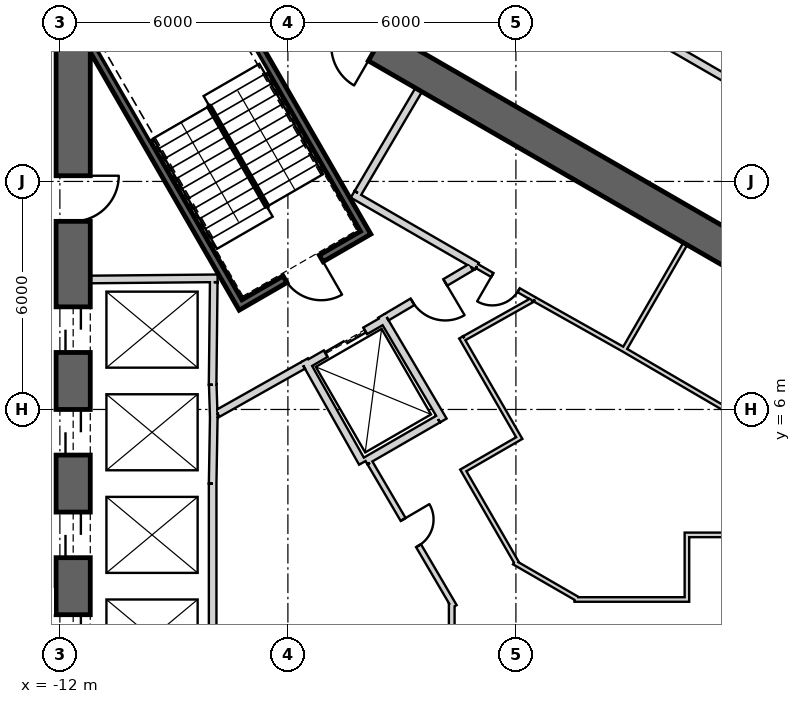
"""IFC4 building model, lengths in metres.
Left out: names, types, materials, properties, quantities, classifications, styles, units other than length and angle.
Written with IfcOpenShell. Run it as: python <this file> out.ifc"""

import sys

from ifc_helpers import new_model, si_unit, direction, frame, frame_2d, origin, place, context, subcontext, project, spatial, rectangle, extrude, element, fill, save


model = new_model("IFC4")
c1 = context("Model", 3, precision=1e-05, world=origin(), true_north=direction((0.0, 1.0)))
c2 = subcontext(c1, "Body", "Model", "MODEL_VIEW")
j1 = project(units=[si_unit("LENGTHUNIT", "METRE"), si_unit("PLANEANGLEUNIT", "RADIAN")], contexts=[c1])
p1 = place(None, origin())
s1 = spatial("IfcSite", under=j1, at=p1, CompositionType="ELEMENT")
p2 = place(p1, origin())
s2 = spatial("IfcBuilding", under=s1, at=p2, CompositionType="ELEMENT")
p3 = place(p2, frame((0.0, 0.0, 310.4)))
s3 = spatial("IfcBuildingStorey", under=s2, at=p3, CompositionType="ELEMENT", Elevation=310.4)
p4 = place(p3, frame((19.475, 2.208, 0.0), z_axis=(0.0, 0.0, 1.0), x_axis=(-0.866028369851, 0.499994862586, 0.0)))
e1 = element("IfcWall", 1, at=p4, inside=s3, PredefinedType="SHEAR", context=c2, shape_type="SweptSolid", body=[
    extrude(rectangle(XDim=31.523, YDim=0.9, at=frame_2d((15.762, 0.0))), origin(), (0.0, 0.0, 1.0), 3.9),
])
p5 = place(p4, frame((7.062, 0.0, 0.0)))
e2 = element("IfcOpeningElement", 2, at=p5, cuts=e1, PredefinedType="OPENING", context=c2, shape_type="SweptSolid", body=[
    extrude(rectangle(XDim=1.2, YDim=2.4, at=frame_2d((0.6, 1.2))), frame((0.0, 0.46, 0.0), z_axis=(0.0, -1.0, 0.0), x_axis=(1.0, 0.0, 0.0)), (0.0, 0.0, 1.0), 0.92),
])
p6 = place(p4, frame((3.612, 0.0, 0.0)))
e3 = element("IfcOpeningElement", 3, at=p6, cuts=e1, PredefinedType="OPENING", context=c2, shape_type="SweptSolid", body=[
    extrude(rectangle(XDim=1.2, YDim=2.4, at=frame_2d((0.6, 1.2))), frame((0.0, 0.46, 0.0), z_axis=(0.0, -1.0, 0.0), x_axis=(1.0, 0.0, 0.0)), (0.0, 0.0, 1.0), 0.92),
])
p7 = place(p4, frame((26.712, 0.0, 0.0)))
e4 = element("IfcOpeningElement", 4, at=p7, cuts=e1, PredefinedType="OPENING", context=c2, shape_type="SweptSolid", body=[
    extrude(rectangle(XDim=1.2, YDim=2.4, at=frame_2d((0.6, 1.2))), frame((0.0, 0.46, 0.0), z_axis=(0.0, -1.0, 0.0), x_axis=(1.0, 0.0, 0.0)), (0.0, 0.0, 1.0), 0.92),
])
p8 = place(p3, frame((-11.65, 15.762, 0.0), z_axis=(0.0, 0.0, 1.0), x_axis=(0.0, -1.0, 0.0)))
e5 = element("IfcWall", 5, at=p8, inside=s3, PredefinedType="SHEAR", context=c2, shape_type="SweptSolid", body=[
    extrude(rectangle(XDim=31.523, YDim=0.9, at=frame_2d((15.762, 0.0))), origin(), (0.0, 0.0, 1.0), 3.9),
])
p9 = place(p8, frame((7.062, 0.0, 0.0)))
e6 = element("IfcOpeningElement", 6, at=p9, cuts=e5, PredefinedType="OPENING", context=c2, shape_type="SweptSolid", body=[
    extrude(rectangle(XDim=1.2, YDim=2.4, at=frame_2d((0.6, 1.2))), frame((0.0, 0.46, 0.0), z_axis=(0.0, -1.0, 0.0), x_axis=(1.0, 0.0, 0.0)), (0.0, 0.0, 1.0), 0.92),
])
p10 = place(p8, frame((9.762, 0.0, 0.0)))
e7 = element("IfcOpeningElement", 7, at=p10, cuts=e5, PredefinedType="OPENING", context=c2, shape_type="SweptSolid", body=[
    extrude(rectangle(XDim=1.2, YDim=2.4, at=frame_2d((0.6, 1.2))), frame((0.0, 0.46, 0.0), z_axis=(0.0, -1.0, 0.0), x_axis=(1.0, 0.0, 0.0)), (0.0, 0.0, 1.0), 0.92),
])
p11 = place(p8, frame((12.462, 0.0, 0.0)))
e8 = element("IfcOpeningElement", 8, at=p11, cuts=e5, PredefinedType="OPENING", context=c2, shape_type="SweptSolid", body=[
    extrude(rectangle(XDim=1.2, YDim=2.4, at=frame_2d((0.6, 1.2))), frame((0.0, 0.46, 0.0), z_axis=(0.0, -1.0, 0.0), x_axis=(1.0, 0.0, 0.0)), (0.0, 0.0, 1.0), 0.92),
])
p12 = place(p8, frame((15.162, 0.0, 0.0)))
e9 = element("IfcOpeningElement", 9, at=p12, cuts=e5, PredefinedType="OPENING", context=c2, shape_type="SweptSolid", body=[
    extrude(rectangle(XDim=1.2, YDim=2.4, at=frame_2d((0.6, 1.2))), frame((0.0, 0.46, 0.0), z_axis=(0.0, -1.0, 0.0), x_axis=(1.0, 0.0, 0.0)), (0.0, 0.0, 1.0), 0.92),
])
p13 = place(p8, frame((17.862, 0.0, 0.0)))
e10 = element("IfcOpeningElement", 10, at=p13, cuts=e5, PredefinedType="OPENING", context=c2, shape_type="SweptSolid", body=[
    extrude(rectangle(XDim=1.2, YDim=2.4, at=frame_2d((0.6, 1.2))), frame((0.0, 0.46, 0.0), z_axis=(0.0, -1.0, 0.0), x_axis=(1.0, 0.0, 0.0)), (0.0, 0.0, 1.0), 0.92),
])
p14 = place(p8, frame((20.562, 0.0, 0.0)))
e11 = element("IfcOpeningElement", 11, at=p14, cuts=e5, PredefinedType="OPENING", context=c2, shape_type="SweptSolid", body=[
    extrude(rectangle(XDim=1.2, YDim=2.4, at=frame_2d((0.6, 1.2))), frame((0.0, 0.46, 0.0), z_axis=(0.0, -1.0, 0.0), x_axis=(1.0, 0.0, 0.0)), (0.0, 0.0, 1.0), 0.92),
])
p15 = place(p8, frame((23.262, 0.0, 0.0)))
e12 = element("IfcOpeningElement", 12, at=p15, cuts=e5, PredefinedType="OPENING", context=c2, shape_type="SweptSolid", body=[
    extrude(rectangle(XDim=1.2, YDim=2.4, at=frame_2d((0.6, 1.2))), frame((0.0, 0.46, 0.0), z_axis=(0.0, -1.0, 0.0), x_axis=(1.0, 0.0, 0.0)), (0.0, 0.0, 1.0), 0.92),
])
p16 = place(p8, frame((3.612, 0.0, 0.0)))
e13 = element("IfcOpeningElement", 13, at=p16, cuts=e5, PredefinedType="OPENING", context=c2, shape_type="SweptSolid", body=[
    extrude(rectangle(XDim=1.2, YDim=2.4, at=frame_2d((0.6, 1.2))), frame((0.0, 0.46, 0.0), z_axis=(0.0, -1.0, 0.0), x_axis=(1.0, 0.0, 0.0)), (0.0, 0.0, 1.0), 0.92),
])
p17 = place(p8, frame((26.712, 0.0, 0.0)))
e14 = element("IfcOpeningElement", 14, at=p17, cuts=e5, PredefinedType="OPENING", context=c2, shape_type="SweptSolid", body=[
    extrude(rectangle(XDim=1.2, YDim=2.4, at=frame_2d((0.6, 1.2))), frame((0.0, 0.46, 0.0), z_axis=(0.0, -1.0, 0.0), x_axis=(1.0, 0.0, 0.0)), (0.0, 0.0, 1.0), 0.92),
])
p18 = place(p3, frame((-11.2, 9.42, 0.0), z_axis=(0.0, 0.0, 1.0), x_axis=(0.999957167047, 0.009255488683, 0.0)))
e15 = element("IfcWall", 15, at=p18, inside=s3, PredefinedType="PLUMBINGWALL", context=c2, shape_type="SweptSolid", body=[
    extrude(rectangle(XDim=3.35, YDim=0.2, at=frame_2d((1.675, 0.0))), origin(), (0.0, 0.0, 1.0), 3.6),
])
p19 = place(p3, frame((-7.951, 9.35, 0.0), z_axis=(0.0, 0.0, 1.0), x_axis=(-0.011120469654, -0.999938165666, 0.0)))
e16 = element("IfcWall", 16, at=p19, inside=s3, PredefinedType="PLUMBINGWALL", context=c2, shape_type="SweptSolid", body=[
    extrude(rectangle(XDim=2.7, YDim=0.2, at=frame_2d((1.35, 0.0))), origin(), (0.0, 0.0, 1.0), 3.6),
])
p20 = place(p3, frame((-7.977, 6.65, 0.0), z_axis=(0.0, 0.0, 1.0), x_axis=(0.030861509705, -0.999523670164, 0.0)))
e17 = element("IfcWall", 17, at=p20, inside=s3, PredefinedType="PLUMBINGWALL", context=c2, shape_type="SweptSolid", body=[
    extrude(rectangle(XDim=0.878, YDim=0.2, at=frame_2d((0.439, 0.0))), origin(), (0.0, 0.0, 1.0), 3.6),
])
p21 = place(p3, frame((-7.949, 5.894, 0.0), z_axis=(0.0, 0.0, 1.0), x_axis=(-0.016809909365, -0.999858703491, 0.0)))
e18 = element("IfcWall", 18, at=p21, inside=s3, PredefinedType="PLUMBINGWALL", context=c2, shape_type="SweptSolid", body=[
    extrude(rectangle(XDim=1.844, YDim=0.2, at=frame_2d((0.922, 0.0))), origin(), (0.0, 0.0, 1.0), 3.6),
])
p22 = place(p3, frame((-7.98, 4.05, 0.0), z_axis=(0.0, 0.0, 1.0), x_axis=(0.0, -1.0, 0.0)))
e19 = element("IfcWall", 19, at=p22, inside=s3, PredefinedType="PLUMBINGWALL", context=c2, shape_type="SweptSolid", body=[
    extrude(rectangle(XDim=8.1, YDim=0.2, at=frame_2d((4.05, 0.0))), origin(), (0.0, 0.0, 1.0), 3.6),
])
p23 = place(p3, frame((-11.245, 15.678, -0.3), z_axis=(0.0, 0.0, 1.0), x_axis=(0.499977274689, -0.866038523851, 0.0)))
e20 = element("IfcWall", 20, at=p23, inside=s3, PredefinedType="SHEAR", context=c2, shape_type="SweptSolid", body=[
    extrude(rectangle(XDim=8.1, YDim=0.2, at=frame_2d((4.05, 0.0))), origin(), (0.0, 0.0, 1.0), 3.9),
])
p24 = place(p3, frame((-7.854, 17.405, -0.3), z_axis=(0.0, 0.0, 1.0), x_axis=(0.499997992926, -0.866026562566, 0.0)))
e21 = element("IfcWall", 21, at=p24, inside=s3, PredefinedType="SHEAR", context=c2, shape_type="SweptSolid", body=[
    extrude(rectangle(XDim=7.9, YDim=0.2, at=frame_2d((3.95, 0.0))), origin(), (0.0, 0.0, 1.0), 3.9),
])
p25 = place(p3, frame((-7.159, 8.8, -0.3), z_axis=(0.0, 0.0, 1.0), x_axis=(0.866047807691, 0.499961193289, 0.0)))
e22 = element("IfcWall", 22, at=p25, inside=s3, PredefinedType="SHEAR", context=c2, shape_type="SweptSolid", body=[
    extrude(rectangle(XDim=3.6, YDim=0.2, at=frame_2d((1.8, 0.0))), origin(), (0.0, 0.0, 1.0), 3.9),
])
p26 = place(p25, frame((1.25, 0.0, 0.3)))
e23 = element("IfcOpeningElement", 23, at=p26, cuts=e22, PredefinedType="OPENING", context=c2, shape_type="SweptSolid", body=[
    extrude(rectangle(XDim=1.1, YDim=2.1, at=frame_2d((0.55, 1.05))), frame((0.0, 0.11, 0.0), z_axis=(0.0, -1.0, 0.0), x_axis=(1.0, 0.0, 0.0)), (0.0, 0.0, 1.0), 0.22),
])
p27 = place(p3, frame((-5.524, 7.168, 0.0), z_axis=(0.0, 0.0, 1.0), x_axis=(0.866024647952, 0.500001309137, 0.0)))
e24 = element("IfcWall", 24, at=p27, inside=s3, PredefinedType="PLUMBINGWALL", context=c2, shape_type="SweptSolid", body=[
    extrude(rectangle(XDim=2.4, YDim=0.2, at=frame_2d((1.2, 0.0))), origin(), (0.0, 0.0, 1.0), 3.6),
])
p28 = place(p27, frame((0.6, 0.0, 0.0)))
e25 = element("IfcOpeningElement", 25, at=p28, cuts=e24, PredefinedType="OPENING", context=c2, shape_type="SweptSolid", body=[
    extrude(rectangle(XDim=1.2, YDim=2.4, at=frame_2d((0.6, 1.2))), frame((0.0, 0.11, 0.0), z_axis=(0.0, -1.0, 0.0), x_axis=(1.0, 0.0, 0.0)), (0.0, 0.0, 1.0), 0.22),
])
p29 = place(p3, frame((-4.039, 4.596, 0.0), z_axis=(0.0, 0.0, 1.0), x_axis=(-0.491322718731, 0.870977603649, 0.0)))
e26 = element("IfcWall", 26, at=p29, inside=s3, PredefinedType="PLUMBINGWALL", context=c2, shape_type="SweptSolid", body=[
    extrude(rectangle(XDim=3.1, YDim=0.2, at=frame_2d((1.55, 0.0))), origin(), (0.0, 0.0, 1.0), 3.6),
])
p30 = place(p3, frame((-3.538, 8.465, 0.0), z_axis=(0.0, 0.0, 1.0), x_axis=(0.508616218331, -0.860993346345, 0.0)))
e27 = element("IfcWall", 27, at=p30, inside=s3, PredefinedType="PLUMBINGWALL", context=c2, shape_type="SweptSolid", body=[
    extrude(rectangle(XDim=3.2, YDim=0.2, at=frame_2d((1.6, 0.0))), origin(), (0.0, 0.0, 1.0), 3.6),
])
p31 = place(p3, frame((-2.047, 5.746, 0.0), z_axis=(0.0, 0.0, 1.0), x_axis=(-0.866019606374, -0.500010041276, 0.0)))
e28 = element("IfcWall", 28, at=p31, inside=s3, PredefinedType="PLUMBINGWALL", context=c2, shape_type="SweptSolid", body=[
    extrude(rectangle(XDim=2.205, YDim=0.2, at=frame_2d((1.102, 0.0))), origin(), (0.0, 0.0, 1.0), 3.6),
])
p32 = place(p3, frame((4.457, 10.359, 0.0), z_axis=(0.0, 0.0, 1.0), x_axis=(-0.500017246033, -0.866015446554, 0.0)))
e29 = element("IfcWall", 29, at=p32, inside=s3, PredefinedType="PARTITIONING", context=c2, shape_type="SweptSolid", body=[
    extrude(rectangle(XDim=3.25, YDim=0.12, at=frame_2d((1.625, 0.0))), origin(), (0.0, 0.0, 1.0), 3.6),
])
p33 = place(p3, frame((7.457, 4.875, 0.0), z_axis=(0.0, 0.0, 1.0), x_axis=(-0.863262357411, 0.504755487615, 0.0)))
e30 = element("IfcWall", 30, at=p33, inside=s3, PredefinedType="PARTITIONING", context=c2, shape_type="SweptSolid", body=[
    extrude(rectangle(XDim=5.37, YDim=0.12, at=frame_2d((2.685, 0.0))), origin(), (0.0, 0.0, 1.0), 3.6),
])
p34 = place(p3, frame((-1.024, 9.771, 0.0), z_axis=(0.0, 0.0, 1.0), x_axis=(0.866039397417, -0.499975761534, 0.0)))
e31 = element("IfcWall", 31, at=p34, inside=s3, PredefinedType="PARTITIONING", context=c2, shape_type="SweptSolid", body=[
    extrude(rectangle(XDim=1.752, YDim=0.12, at=frame_2d((0.876, 0.0))), origin(), (0.0, 0.0, 1.0), 3.6),
])
p35 = place(p34, frame((0.466, 0.0, 0.0)))
e32 = element("IfcOpeningElement", 32, at=p35, cuts=e31, PredefinedType="OPENING", context=c2, shape_type="SweptSolid", body=[
    extrude(rectangle(XDim=0.8, YDim=2.1, at=frame_2d((0.4, 1.05))), frame((0.0, 0.07, 0.0), z_axis=(0.0, -1.0, 0.0), x_axis=(1.0, 0.0, 0.0)), (0.0, 0.0, 1.0), 0.14),
])
p36 = place(p3, frame((-4.296, 11.66, 0.0), z_axis=(0.0, 0.0, 1.0), x_axis=(0.866027389382, -0.499996560828, 0.0)))
e33 = element("IfcWall", 33, at=p36, inside=s3, PredefinedType="PARTITIONING", context=c2, shape_type="SweptSolid", body=[
    extrude(rectangle(XDim=3.778, YDim=0.2, at=frame_2d((1.889, 0.0))), origin(), (0.0, 0.0, 1.0), 3.6),
])
p37 = place(p3, frame((-2.558, 14.409, 0.0), z_axis=(0.0, 0.0, 1.0), x_axis=(-0.508018930956, -0.861345903683, 0.0)))
e34 = element("IfcWall", 34, at=p37, inside=s3, PredefinedType="PARTITIONING", context=c2, shape_type="SweptSolid", body=[
    extrude(rectangle(XDim=3.15, YDim=0.2, at=frame_2d((1.575, 0.0))), origin(), (0.0, 0.0, 1.0), 3.6),
])
p38 = place(p3, frame((2.821, 7.586, 0.0), z_axis=(0.0, 0.0, 1.0), x_axis=(-0.871426548871, 0.490526013503, 0.0)))
e35 = element("IfcWall", 35, at=p38, inside=s3, PredefinedType="PARTITIONING", context=c2, shape_type="SweptSolid", body=[
    extrude(rectangle(XDim=2.67, YDim=0.12, at=frame_2d((1.335, 0.0))), origin(), (0.0, 0.0, 1.0), 3.6),
])
p39 = place(p3, frame((-5.6, 7.16, 0.0), z_axis=(0.0, 0.0, 1.0), x_axis=(-0.871340486379, -0.490678873396, 0.0)))
e36 = element("IfcWall", 36, at=p39, inside=s3, PredefinedType="PARTITIONING", context=c2, shape_type="SweptSolid", body=[
    extrude(rectangle(XDim=2.581, YDim=0.2, at=frame_2d((1.291, 0.0))), origin(), (0.0, 0.0, 1.0), 3.6),
])
p40 = place(p3, frame((-1.179, 9.745, 0.0), z_axis=(0.0, 0.0, 1.0), x_axis=(-0.860630814782, -0.509229418482, 0.0)))
e37 = element("IfcWall", 37, at=p40, inside=s3, PredefinedType="PARTITIONING", context=c2, shape_type="SweptSolid", body=[
    extrude(rectangle(XDim=2.582, YDim=0.2, at=frame_2d((1.291, 0.0))), origin(), (0.0, 0.0, 1.0), 3.6),
])
p41 = place(p40, frame((0.791, 0.0, 0.0)))
e38 = element("IfcOpeningElement", 38, at=p41, cuts=e37, PredefinedType="OPENING", context=c2, shape_type="SweptSolid", body=[
    extrude(rectangle(XDim=1.0, YDim=2.1, at=frame_2d((0.5, 1.05))), frame((0.0, 0.11, 0.0), z_axis=(0.0, -1.0, 0.0), x_axis=(1.0, 0.0, 0.0)), (0.0, 0.0, 1.0), 0.22),
])
p42 = place(p3, frame((-1.624, 0.815, 0.0), z_axis=(0.0, 0.0, 1.0), x_axis=(-0.505868173579, 0.862610799237, 0.0)))
e39 = element("IfcWall", 39, at=p42, inside=s3, PredefinedType="PLUMBINGWALL", context=c2, shape_type="SweptSolid", body=[
    extrude(rectangle(XDim=4.383, YDim=0.15, at=frame_2d((2.191, 0.0))), origin(), (0.0, 0.0, 1.0), 3.6),
])
p43 = place(p42, frame((1.855, 0.0, 0.0)))
e40 = element("IfcOpeningElement", 40, at=p43, cuts=e39, PredefinedType="OPENING", context=c2, shape_type="SweptSolid", body=[
    extrude(rectangle(XDim=0.8, YDim=2.1, at=frame_2d((0.4, 1.05))), frame((0.0, 0.085, 0.0), z_axis=(0.0, -1.0, 0.0), x_axis=(1.0, 0.0, 0.0)), (0.0, 0.0, 1.0), 0.17),
])
p44 = place(p3, frame((-1.689, -1.053, 0.0), z_axis=(0.0, 0.0, 1.0), x_axis=(0.0, 1.0, 0.0)))
e41 = element("IfcWall", 41, at=p44, inside=s3, PredefinedType="PLUMBINGWALL", context=c2, shape_type="SweptSolid", body=[
    extrude(rectangle(XDim=1.954, YDim=0.15, at=frame_2d((0.977, 0.0))), origin(), (0.0, 0.0, 1.0), 3.6),
])
p45 = place(p3, frame((4.44, 2.7, 0.0), z_axis=(0.0, 0.0, 1.0), x_axis=(1.0, 0.0, 0.0)))
e42 = element("IfcWall", 42, at=p45, inside=s3, PredefinedType="PARTITIONING", context=c2, shape_type="SweptSolid", body=[
    extrude(rectangle(XDim=3.0, YDim=0.12, at=frame_2d((1.5, 0.0))), origin(), (0.0, 0.0, 1.0), 3.6),
])
p46 = place(p45, frame((1.13, 0.0, 0.0)))
e43 = element("IfcOpeningElement", 43, at=p46, cuts=e42, PredefinedType="OPENING", context=c2, shape_type="SweptSolid", body=[
    extrude(rectangle(XDim=0.8, YDim=2.1, at=frame_2d((0.4, 1.05))), frame((0.0, 0.07, 0.0), z_axis=(0.0, -1.0, 0.0), x_axis=(1.0, 0.0, 0.0)), (0.0, 0.0, 1.0), 0.14),
])
p47 = place(p3, frame((4.5, 0.94, 0.0), z_axis=(0.0, 0.0, 1.0), x_axis=(0.0, 1.0, 0.0)))
e44 = element("IfcWall", 44, at=p47, inside=s3, PredefinedType="PARTITIONING", context=c2, shape_type="SweptSolid", body=[
    extrude(rectangle(XDim=1.7, YDim=0.12, at=frame_2d((0.85, 0.0))), origin(), (0.0, 0.0, 1.0), 3.6),
])
p48 = place(p3, frame((1.542, 1.0, 0.0), z_axis=(0.0, 0.0, 1.0), x_axis=(1.0, 0.0, 0.0)))
e45 = element("IfcWall", 45, at=p48, inside=s3, PredefinedType="PARTITIONING", context=c2, shape_type="SweptSolid", body=[
    extrude(rectangle(XDim=2.898, YDim=0.12, at=frame_2d((1.449, 0.0))), origin(), (0.0, 0.0, 1.0), 3.6),
])
p49 = place(p3, frame((-0.047, 1.977, 0.0), z_axis=(0.0, 0.0, 1.0), x_axis=(0.865998615205, -0.500046396311, 0.0)))
e46 = element("IfcWall", 46, at=p49, inside=s3, PredefinedType="PARTITIONING", context=c2, shape_type="SweptSolid", body=[
    extrude(rectangle(XDim=1.935, YDim=0.12, at=frame_2d((0.968, 0.0))), origin(), (0.0, 0.0, 1.0), 3.6),
])
p50 = place(p3, frame((-1.414, 4.449, 0.0), z_axis=(0.0, 0.0, 1.0), x_axis=(0.500028961621, -0.866008682139, 0.0)))
e47 = element("IfcWall", 47, at=p50, inside=s3, PredefinedType="PARTITIONING", context=c2, shape_type="SweptSolid", body=[
    extrude(rectangle(XDim=2.896, YDim=0.12, at=frame_2d((1.448, 0.0))), origin(), (0.0, 0.0, 1.0), 3.6),
])
p51 = place(p3, frame((0.14, 5.277, 0.0), z_axis=(0.0, 0.0, 1.0), x_axis=(-0.865989465428, -0.500062241894, 0.0)))
e48 = element("IfcWall", 48, at=p51, inside=s3, PredefinedType="PARTITIONING", context=c2, shape_type="SweptSolid", body=[
    extrude(rectangle(XDim=1.7, YDim=0.12, at=frame_2d((0.85, 0.0))), origin(), (0.0, 0.0, 1.0), 3.6),
])
p52 = place(p3, frame((-1.442, 7.897, 0.0), z_axis=(0.0, 0.0, 1.0), x_axis=(0.499990139034, -0.866031096941, 0.0)))
e49 = element("IfcWall", 49, at=p52, inside=s3, PredefinedType="PARTITIONING", context=c2, shape_type="SweptSolid", body=[
    extrude(rectangle(XDim=3.0, YDim=0.12, at=frame_2d((1.5, 0.0))), origin(), (0.0, 0.0, 1.0), 3.6),
])
p53 = place(p3, frame((0.414, 8.871, 0.0), z_axis=(0.0, 0.0, 1.0), x_axis=(-0.871809386997, -0.48984527429, 0.0)))
e50 = element("IfcWall", 50, at=p53, inside=s3, PredefinedType="PARTITIONING", context=c2, shape_type="SweptSolid", body=[
    extrude(rectangle(XDim=2.034, YDim=0.12, at=frame_2d((1.017, 0.0))), origin(), (0.0, 0.0, 1.0), 3.6),
])
p54 = place(p3, frame((7.289, 13.689, 0.0), z_axis=(0.0, 0.0, 1.0), x_axis=(-0.866022017938, 0.500005864412, 0.0)))
e51 = element("IfcWall", 51, at=p54, inside=s3, PredefinedType="PARTITIONING", context=c2, shape_type="SweptSolid", body=[
    extrude(rectangle(XDim=15.808, YDim=0.2, at=frame_2d((7.904, 0.0))), origin(), (0.0, 0.0, 1.0), 2.88),
])
p55 = place(p54, frame((7.404, 0.0, 0.0)))
e52 = element("IfcOpeningElement", 52, at=p55, cuts=e51, PredefinedType="OPENING", context=c2, shape_type="SweptSolid", body=[
    extrude(rectangle(XDim=1.0, YDim=2.1, at=frame_2d((0.5, 1.05))), frame((0.0, 0.11, 0.0), z_axis=(0.0, -1.0, 0.0), x_axis=(1.0, 0.0, 0.0)), (0.0, 0.0, 1.0), 0.22),
])
p56 = place(p26, origin())
e53 = element("IfcDoor", 53, at=p56, inside=s3, OperationType="SINGLE_SWING_LEFT", PredefinedType="USERDEFINED", context=c2, shape_type="SweptSolid", body=[
    extrude(rectangle(XDim=1.1, YDim=2.1, at=frame_2d((0.55, 1.05))), frame((0.0, 0.025, 0.0), z_axis=(0.0, -1.0, 0.0), x_axis=(1.0, 0.0, 0.0)), (0.0, 0.0, 1.0), 0.05),
])
fill(e23, e53)
p57 = place(p41, origin())
e54 = element("IfcDoor", 54, at=p57, inside=s3, OperationType="SINGLE_SWING_LEFT", PredefinedType="USERDEFINED", context=c2, shape_type="SweptSolid", body=[
    extrude(rectangle(XDim=1.0, YDim=2.1, at=frame_2d((0.5, 1.05))), frame((0.0, 0.025, 0.0), z_axis=(0.0, -1.0, 0.0), x_axis=(1.0, 0.0, 0.0)), (0.0, 0.0, 1.0), 0.05),
])
fill(e38, e54)
p58 = place(p28, origin())
e55 = element("IfcDoor", 55, at=p58, inside=s3, OperationType="SLIDING_TO_LEFT", PredefinedType="USERDEFINED", context=c2, shape_type="SweptSolid", body=[
    extrude(rectangle(XDim=1.2, YDim=2.4, at=frame_2d((0.6, 1.2))), frame((0.0, 0.025, 0.0), z_axis=(0.0, -1.0, 0.0), x_axis=(1.0, 0.0, 0.0)), (0.0, 0.0, 1.0), 0.05),
])
fill(e25, e55)
p59 = place(p43, origin())
e56 = element("IfcDoor", 56, at=p59, inside=s3, OperationType="SINGLE_SWING_LEFT", PredefinedType="USERDEFINED", context=c2, shape_type="SweptSolid", body=[
    extrude(rectangle(XDim=0.8, YDim=2.1, at=frame_2d((0.4, 1.05))), frame((0.0, 0.025, 0.0), z_axis=(0.0, -1.0, 0.0), x_axis=(1.0, 0.0, 0.0)), (0.0, 0.0, 1.0), 0.05),
])
fill(e40, e56)
p60 = place(p35, origin())
e57 = element("IfcDoor", 57, at=p60, inside=s3, OperationType="SINGLE_SWING_RIGHT", PredefinedType="USERDEFINED", context=c2, shape_type="SweptSolid", body=[
    extrude(rectangle(XDim=0.8, YDim=2.1, at=frame_2d((0.4, 1.05))), frame((0.0, 0.025, 0.0), z_axis=(0.0, -1.0, 0.0), x_axis=(1.0, 0.0, 0.0)), (0.0, 0.0, 1.0), 0.05),
])
fill(e32, e57)
p61 = place(p9, origin())
e58 = element("IfcDoor", 58, at=p61, inside=s3, OperationType="SLIDING_TO_LEFT", PredefinedType="USERDEFINED", context=c2, shape_type="SweptSolid", body=[
    extrude(rectangle(XDim=1.2, YDim=2.4, at=frame_2d((0.6, 1.2))), frame((0.0, 0.025, 0.0), z_axis=(0.0, -1.0, 0.0), x_axis=(1.0, 0.0, 0.0)), (0.0, 0.0, 1.0), 0.05),
])
fill(e6, e58)
p62 = place(p10, origin())
e59 = element("IfcDoor", 59, at=p62, inside=s3, OperationType="SLIDING_TO_LEFT", PredefinedType="USERDEFINED", context=c2, shape_type="SweptSolid", body=[
    extrude(rectangle(XDim=1.2, YDim=2.4, at=frame_2d((0.6, 1.2))), frame((0.0, 0.025, 0.0), z_axis=(0.0, -1.0, 0.0), x_axis=(1.0, 0.0, 0.0)), (0.0, 0.0, 1.0), 0.05),
])
fill(e7, e59)
p63 = place(p11, origin())
e60 = element("IfcDoor", 60, at=p63, inside=s3, OperationType="SLIDING_TO_LEFT", PredefinedType="USERDEFINED", context=c2, shape_type="SweptSolid", body=[
    extrude(rectangle(XDim=1.2, YDim=2.4, at=frame_2d((0.6, 1.2))), frame((0.0, 0.025, 0.0), z_axis=(0.0, -1.0, 0.0), x_axis=(1.0, 0.0, 0.0)), (0.0, 0.0, 1.0), 0.05),
])
fill(e8, e60)
p64 = place(p12, origin())
e61 = element("IfcDoor", 61, at=p64, inside=s3, OperationType="SLIDING_TO_LEFT", PredefinedType="USERDEFINED", context=c2, shape_type="SweptSolid", body=[
    extrude(rectangle(XDim=1.2, YDim=2.4, at=frame_2d((0.6, 1.2))), frame((0.0, 0.025, 0.0), z_axis=(0.0, -1.0, 0.0), x_axis=(1.0, 0.0, 0.0)), (0.0, 0.0, 1.0), 0.05),
])
fill(e9, e61)
p65 = place(p16, origin())
e62 = element("IfcDoor", 62, at=p65, inside=s3, OperationType="SINGLE_SWING_LEFT", PredefinedType="USERDEFINED", context=c2, shape_type="SweptSolid", body=[
    extrude(rectangle(XDim=1.2, YDim=2.4, at=frame_2d((0.6, 1.2))), frame((0.0, 0.025, 0.0), z_axis=(0.0, -1.0, 0.0), x_axis=(1.0, 0.0, 0.0)), (0.0, 0.0, 1.0), 0.05),
])
fill(e13, e62)
save(model, sys.argv[1])
